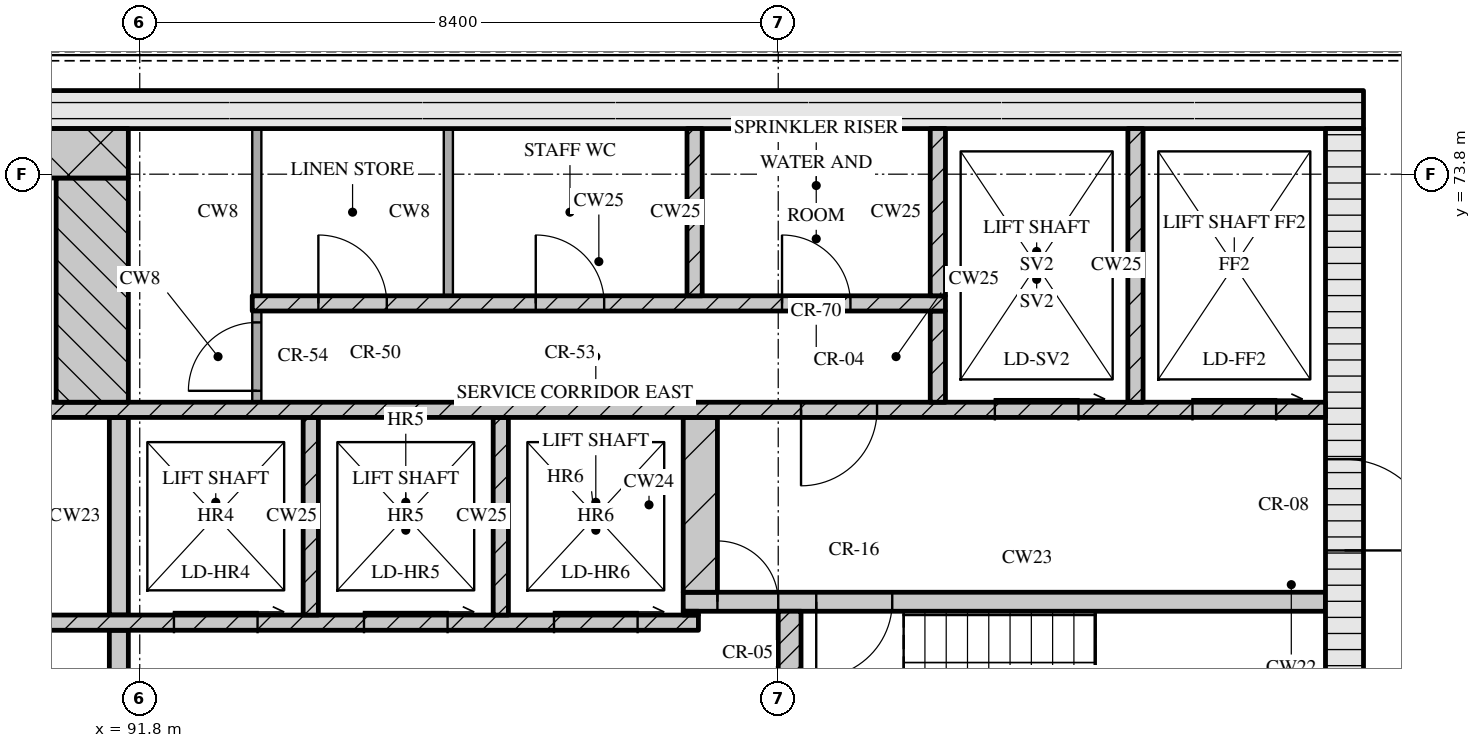
"""IFC4 building model, lengths in metres.
Left out: names, types, materials, properties, quantities, classifications, styles, units other than length and angle.
Written with IfcOpenShell. Run it as: python <this file> out.ifc"""

import sys

from ifc_helpers import new_model, si_unit, direction, frame, frame_2d, origin, place, context, subcontext, project, spatial, rectangle, extrude, element, fill, save


model = new_model("IFC4")
c1 = context("Model", 3, precision=1e-05, world=origin(), true_north=direction((0.0, 1.0)))
c2 = subcontext(c1, "Body", "Model", "MODEL_VIEW")
j1 = project(units=[si_unit("LENGTHUNIT", "METRE"), si_unit("PLANEANGLEUNIT", "RADIAN")], contexts=[c1])
p1 = place(None, origin())
s1 = spatial("IfcSite", under=j1, at=p1, CompositionType="ELEMENT")
p2 = place(p1, origin())
s2 = spatial("IfcBuilding", under=s1, at=p2, CompositionType="ELEMENT")
p3 = place(p2, frame((0.0, 0.0, 303.15)))
s3 = spatial("IfcBuildingStorey", under=s2, at=p3, CompositionType="ELEMENT", Elevation=303.15)
p4 = place(p3, frame((67.3, 74.65, 0.0), z_axis=(0.0, 0.0, 1.0), x_axis=(1.0, 0.0, 0.0)))
e1 = element("IfcWall", 1, at=p4, inside=s3, PredefinedType="SOLIDWALL", context=c2, shape_type="SweptSolid", body=[
    extrude(rectangle(XDim=40.6, YDim=0.5, at=frame_2d((20.3, 0.0))), origin(), (0.0, 0.0, 1.0), 3.32),
])
p5 = place(p3, frame((107.65, 62.4, 0.0), z_axis=(0.0, 0.0, 1.0), x_axis=(0.0, 1.0, 0.0)))
e2 = element("IfcWall", 2, at=p5, inside=s3, PredefinedType="SOLIDWALL", context=c2, shape_type="SweptSolid", body=[
    extrude(rectangle(XDim=12.0, YDim=0.5, at=frame_2d((6.0, 0.0))), origin(), (0.0, 0.0, 1.0), 3.32),
])
p6 = place(p5, frame((6.45, 0.0, 0.0)))
e3 = element("IfcOpeningElement", 3, at=p6, cuts=e2, PredefinedType="OPENING", context=c2, shape_type="SweptSolid", body=[
    extrude(rectangle(XDim=1.2, YDim=2.1, at=frame_2d((0.6, 1.05))), frame((0.0, 0.26, 0.0), z_axis=(0.0, -1.0, 0.0), x_axis=(1.0, 0.0, 0.0)), (0.0, 0.0, 1.0), 0.52),
])
p7 = place(p3, frame((91.525, 65.2, 0.0), z_axis=(0.0, 0.0, 1.0), x_axis=(0.0, 1.0, 0.0)))
e4 = element("IfcWall", 4, at=p7, inside=s3, PredefinedType="SOLIDWALL", context=c2, shape_type="SweptSolid", body=[
    extrude(rectangle(XDim=2.6, YDim=0.25, at=frame_2d((1.3, 0.0))), origin(), (0.0, 0.0, 1.0), 3.32),
])
p8 = place(p7, frame((0.7, 0.0, 0.0)))
e5 = element("IfcOpeningElement", 5, at=p8, cuts=e4, PredefinedType="OPENING", context=c2, shape_type="SweptSolid", body=[
    extrude(rectangle(XDim=1.2, YDim=2.1, at=frame_2d((0.6, 1.05))), frame((0.0, 0.135, 0.0), z_axis=(0.0, -1.0, 0.0), x_axis=(1.0, 0.0, 0.0)), (0.0, 0.0, 1.0), 0.27),
])
p9 = place(p3, frame((100.35, 65.2, 0.0), z_axis=(0.0, 0.0, 1.0), x_axis=(0.0, 1.0, 0.0)))
e6 = element("IfcWall", 6, at=p9, inside=s3, PredefinedType="SOLIDWALL", context=c2, shape_type="SweptSolid", body=[
    extrude(rectangle(XDim=2.85, YDim=0.3, at=frame_2d((1.425, 0.0))), origin(), (0.0, 0.0, 1.0), 3.32),
])
p10 = place(p3, frame((76.05, 67.9, 0.0), z_axis=(0.0, 0.0, 1.0), x_axis=(1.0, 0.0, 0.0)))
e7 = element("IfcWall", 7, at=p10, inside=s3, PredefinedType="SOLIDWALL", context=c2, shape_type="SweptSolid", body=[
    extrude(rectangle(XDim=23.1, YDim=0.2, at=frame_2d((11.55, 0.0))), origin(), (0.0, 0.0, 1.0), 3.32),
])
p11 = place(p10, frame((1.4, 0.0, 0.0)))
e8 = element("IfcOpeningElement", 8, at=p11, cuts=e7, PredefinedType="OPENING", context=c2, shape_type="SweptSolid", body=[
    extrude(rectangle(XDim=0.9, YDim=2.1, at=frame_2d((0.45, 1.05))), frame((0.0, 0.11, 0.0), z_axis=(0.0, -1.0, 0.0), x_axis=(1.0, 0.0, 0.0)), (0.0, 0.0, 1.0), 0.22),
])
p12 = place(p10, frame((5.11, 0.0, 0.0)))
e9 = element("IfcOpeningElement", 9, at=p12, cuts=e7, PredefinedType="OPENING", context=c2, shape_type="SweptSolid", body=[
    extrude(rectangle(XDim=0.9, YDim=2.1, at=frame_2d((0.45, 1.05))), frame((0.0, 0.11, 0.0), z_axis=(0.0, -1.0, 0.0), x_axis=(1.0, 0.0, 0.0)), (0.0, 0.0, 1.0), 0.22),
])
p13 = place(p10, frame((8.45, 0.0, 0.0)))
e10 = element("IfcOpeningElement", 10, at=p13, cuts=e7, PredefinedType="OPENING", context=c2, shape_type="SweptSolid", body=[
    extrude(rectangle(XDim=0.9, YDim=2.1, at=frame_2d((0.45, 1.05))), frame((0.0, 0.11, 0.0), z_axis=(0.0, -1.0, 0.0), x_axis=(1.0, 0.0, 0.0)), (0.0, 0.0, 1.0), 0.22),
])
p14 = place(p10, frame((10.91, 0.0, 0.0)))
e11 = element("IfcOpeningElement", 11, at=p14, cuts=e7, PredefinedType="OPENING", context=c2, shape_type="SweptSolid", body=[
    extrude(rectangle(XDim=0.9, YDim=2.1, at=frame_2d((0.45, 1.05))), frame((0.0, 0.11, 0.0), z_axis=(0.0, -1.0, 0.0), x_axis=(1.0, 0.0, 0.0)), (0.0, 0.0, 1.0), 0.22),
])
p15 = place(p10, frame((13.55, 0.0, 0.0)))
e12 = element("IfcOpeningElement", 12, at=p15, cuts=e7, PredefinedType="OPENING", context=c2, shape_type="SweptSolid", body=[
    extrude(rectangle(XDim=1.0, YDim=2.1, at=frame_2d((0.5, 1.05))), frame((0.0, 0.11, 0.0), z_axis=(0.0, -1.0, 0.0), x_axis=(1.0, 0.0, 0.0)), (0.0, 0.0, 1.0), 0.22),
])
p16 = place(p10, frame((16.2, 0.0, 0.0)))
e13 = element("IfcOpeningElement", 13, at=p16, cuts=e7, PredefinedType="OPENING", context=c2, shape_type="SweptSolid", body=[
    extrude(rectangle(XDim=1.1, YDim=2.1, at=frame_2d((0.55, 1.05))), frame((0.0, 0.11, 0.0), z_axis=(0.0, -1.0, 0.0), x_axis=(1.0, 0.0, 0.0)), (0.0, 0.0, 1.0), 0.22),
])
p17 = place(p10, frame((18.7, 0.0, 0.0)))
e14 = element("IfcOpeningElement", 14, at=p17, cuts=e7, PredefinedType="OPENING", context=c2, shape_type="SweptSolid", body=[
    extrude(rectangle(XDim=1.1, YDim=2.1, at=frame_2d((0.55, 1.05))), frame((0.0, 0.11, 0.0), z_axis=(0.0, -1.0, 0.0), x_axis=(1.0, 0.0, 0.0)), (0.0, 0.0, 1.0), 0.22),
])
p18 = place(p10, frame((21.2, 0.0, 0.0)))
e15 = element("IfcOpeningElement", 15, at=p18, cuts=e7, PredefinedType="OPENING", context=c2, shape_type="SweptSolid", body=[
    extrude(rectangle(XDim=1.1, YDim=2.1, at=frame_2d((0.55, 1.05))), frame((0.0, 0.11, 0.0), z_axis=(0.0, -1.0, 0.0), x_axis=(1.0, 0.0, 0.0)), (0.0, 0.0, 1.0), 0.22),
])
p19 = place(p3, frame((91.525, 68.0, 0.0), z_axis=(0.0, 0.0, 1.0), x_axis=(0.0, 1.0, 0.0)))
e16 = element("IfcWall", 16, at=p19, inside=s3, PredefinedType="SOLIDWALL", context=c2, shape_type="SweptSolid", body=[
    extrude(rectangle(XDim=2.6, YDim=0.25, at=frame_2d((1.3, 0.0))), origin(), (0.0, 0.0, 1.0), 3.32),
])
for number, where, z_axis, x_axis in (
    (17, (94.05, 68.0, 0.0), (0.0, 0.0, 1.0), (0.0, 1.0, 0.0)),
    (18, (96.55, 68.0, 0.0), (0.0, 0.0, 1.0), (0.0, 1.0, 0.0)),
):
    element("IfcWall", number, at=place(p3, frame(where, z_axis=z_axis, x_axis=x_axis)), inside=s3, PredefinedType="SOLIDWALL", context=c2, shape_type="SweptSolid", body=[
        extrude(rectangle(XDim=2.6, YDim=0.2, at=frame_2d((1.3, 0.0))), origin(), (0.0, 0.0, 1.0), 3.32),
    ])
p20 = place(p3, frame((98.95, 68.025, 0.0), z_axis=(0.0, 0.0, 1.0), x_axis=(1.0, 0.0, 0.0)))
e19 = element("IfcWall", 19, at=p20, inside=s3, PredefinedType="SOLIDWALL", context=c2, shape_type="SweptSolid", body=[
    extrude(rectangle(XDim=0.2, YDim=0.05, at=frame_2d((0.1, 0.0))), origin(), (0.0, 0.0, 1.0), 3.32),
])
p21 = place(p3, frame((98.95, 68.175, 0.0), z_axis=(0.0, 0.0, 1.0), x_axis=(1.0, 0.0, 0.0)))
e20 = element("IfcWall", 20, at=p21, inside=s3, PredefinedType="SOLIDWALL", context=c2, shape_type="SweptSolid", body=[
    extrude(rectangle(XDim=8.45, YDim=0.25, at=frame_2d((4.225, 0.0))), origin(), (0.0, 0.0, 1.0), 3.32),
])
p22 = place(p21, frame((0.45, 0.0, 0.0)))
e21 = element("IfcOpeningElement", 21, at=p22, cuts=e20, PredefinedType="OPENING", context=c2, shape_type="SweptSolid", body=[
    extrude(rectangle(XDim=0.8, YDim=2.1, at=frame_2d((0.4, 1.05))), frame((0.0, 0.135, 0.0), z_axis=(0.0, -1.0, 0.0), x_axis=(1.0, 0.0, 0.0)), (0.0, 0.0, 1.0), 0.27),
])
p23 = place(p21, frame((1.75, 0.0, 0.0)))
e22 = element("IfcOpeningElement", 22, at=p23, cuts=e20, PredefinedType="OPENING", context=c2, shape_type="SweptSolid", body=[
    extrude(rectangle(XDim=1.0, YDim=2.1, at=frame_2d((0.5, 1.05))), frame((0.0, 0.135, 0.0), z_axis=(0.0, -1.0, 0.0), x_axis=(1.0, 0.0, 0.0)), (0.0, 0.0, 1.0), 0.27),
])
p24 = place(p3, frame((99.175, 68.3, 0.0), z_axis=(0.0, 0.0, 1.0), x_axis=(0.0, 1.0, 0.0)))
e23 = element("IfcWall", 23, at=p24, inside=s3, PredefinedType="SOLIDWALL", context=c2, shape_type="SweptSolid", body=[
    extrude(rectangle(XDim=2.3, YDim=0.45, at=frame_2d((1.15, 0.0))), origin(), (0.0, 0.0, 1.0), 3.32),
])
p25 = place(p3, frame((67.8, 70.7, 0.0), z_axis=(0.0, 0.0, 1.0), x_axis=(1.0, 0.0, 0.0)))
e24 = element("IfcWall", 24, at=p25, inside=s3, PredefinedType="SOLIDWALL", context=c2, shape_type="SweptSolid", body=[
    extrude(rectangle(XDim=39.6, YDim=0.2, at=frame_2d((19.8, 0.0))), origin(), (0.0, 0.0, 1.0), 3.32),
])
p26 = place(p25, frame((0.65, 0.0, 0.0)))
e25 = element("IfcOpeningElement", 25, at=p26, cuts=e24, PredefinedType="OPENING", context=c2, shape_type="SweptSolid", body=[
    extrude(rectangle(XDim=1.1, YDim=2.1, at=frame_2d((0.55, 1.05))), frame((0.0, 0.11, 0.0), z_axis=(0.0, -1.0, 0.0), x_axis=(1.0, 0.0, 0.0)), (0.0, 0.0, 1.0), 0.22),
])
p27 = place(p25, frame((3.25, 0.0, 0.0)))
e26 = element("IfcOpeningElement", 26, at=p27, cuts=e24, PredefinedType="OPENING", context=c2, shape_type="SweptSolid", body=[
    extrude(rectangle(XDim=1.1, YDim=2.1, at=frame_2d((0.55, 1.05))), frame((0.0, 0.11, 0.0), z_axis=(0.0, -1.0, 0.0), x_axis=(1.0, 0.0, 0.0)), (0.0, 0.0, 1.0), 0.22),
])
p28 = place(p25, frame((5.9, 0.0, 0.0)))
e27 = element("IfcOpeningElement", 27, at=p28, cuts=e24, PredefinedType="OPENING", context=c2, shape_type="SweptSolid", body=[
    extrude(rectangle(XDim=1.0, YDim=2.1, at=frame_2d((0.5, 1.05))), frame((0.0, 0.11, 0.0), z_axis=(0.0, -1.0, 0.0), x_axis=(1.0, 0.0, 0.0)), (0.0, 0.0, 1.0), 0.22),
])
p29 = place(p25, frame((21.7, 0.0, 0.0)))
e28 = element("IfcOpeningElement", 28, at=p29, cuts=e24, PredefinedType="OPENING", context=c2, shape_type="SweptSolid", body=[
    extrude(rectangle(XDim=1.0, YDim=2.1, at=frame_2d((0.5, 1.05))), frame((0.0, 0.11, 0.0), z_axis=(0.0, -1.0, 0.0), x_axis=(1.0, 0.0, 0.0)), (0.0, 0.0, 1.0), 0.22),
])
p30 = place(p25, frame((32.7, 0.0, 0.0)))
e29 = element("IfcOpeningElement", 29, at=p30, cuts=e24, PredefinedType="OPENING", context=c2, shape_type="SweptSolid", body=[
    extrude(rectangle(XDim=1.0, YDim=2.1, at=frame_2d((0.5, 1.05))), frame((0.0, 0.11, 0.0), z_axis=(0.0, -1.0, 0.0), x_axis=(1.0, 0.0, 0.0)), (0.0, 0.0, 1.0), 0.22),
])
p31 = place(p25, frame((35.25, 0.0, 0.0)))
e30 = element("IfcOpeningElement", 30, at=p31, cuts=e24, PredefinedType="OPENING", context=c2, shape_type="SweptSolid", body=[
    extrude(rectangle(XDim=1.1, YDim=2.1, at=frame_2d((0.55, 1.05))), frame((0.0, 0.11, 0.0), z_axis=(0.0, -1.0, 0.0), x_axis=(1.0, 0.0, 0.0)), (0.0, 0.0, 1.0), 0.22),
])
p32 = place(p25, frame((37.85, 0.0, 0.0)))
e31 = element("IfcOpeningElement", 31, at=p32, cuts=e24, PredefinedType="OPENING", context=c2, shape_type="SweptSolid", body=[
    extrude(rectangle(XDim=1.1, YDim=2.1, at=frame_2d((0.55, 1.05))), frame((0.0, 0.11, 0.0), z_axis=(0.0, -1.0, 0.0), x_axis=(1.0, 0.0, 0.0)), (0.0, 0.0, 1.0), 0.22),
])
p33 = place(p3, frame((91.175, 70.8, 0.0), z_axis=(0.0, 0.0, 1.0), x_axis=(0.0, 1.0, 0.0)))
e32 = element("IfcWall", 32, at=p33, inside=s3, PredefinedType="SOLIDWALL", context=c2, shape_type="SweptSolid", body=[
    extrude(rectangle(XDim=2.95, YDim=0.95, at=frame_2d((1.475, 0.0))), origin(), (0.0, 0.0, 1.0), 3.32),
])
p34 = place(p3, frame((93.34, 70.8, 0.0), z_axis=(0.0, 0.0, 1.0), x_axis=(0.0, 1.0, 0.0)))
e33 = element("IfcWall", 33, at=p34, inside=s3, PredefinedType="PARTITIONING", context=c2, shape_type="SweptSolid", body=[
    extrude(rectangle(XDim=1.2, YDim=0.12, at=frame_2d((0.6, 0.0))), origin(), (0.0, 0.0, 1.0), 3.32),
])
p35 = place(p34, frame((0.15, 0.0, 0.0)))
e34 = element("IfcOpeningElement", 34, at=p35, cuts=e33, PredefinedType="OPENING", context=c2, shape_type="SweptSolid", body=[
    extrude(rectangle(XDim=0.9, YDim=2.1, at=frame_2d((0.45, 1.05))), frame((0.0, 0.07, 0.0), z_axis=(0.0, -1.0, 0.0), x_axis=(1.0, 0.0, 0.0)), (0.0, 0.0, 1.0), 0.14),
])
p36 = place(p3, frame((102.3, 70.8, 0.0), z_axis=(0.0, 0.0, 1.0), x_axis=(0.0, 1.0, 0.0)))
e35 = element("IfcWall", 35, at=p36, inside=s3, PredefinedType="SOLIDWALL", context=c2, shape_type="SweptSolid", body=[
    extrude(rectangle(XDim=1.2, YDim=0.2, at=frame_2d((0.6, 0.0))), origin(), (0.0, 0.0, 1.0), 3.32),
])
p37 = place(p3, frame((104.9, 70.8, 0.0), z_axis=(0.0, 0.0, 1.0), x_axis=(0.0, 1.0, 0.0)))
e36 = element("IfcWall", 36, at=p37, inside=s3, PredefinedType="SOLIDWALL", context=c2, shape_type="SweptSolid", body=[
    extrude(rectangle(XDim=3.6, YDim=0.2, at=frame_2d((1.8, 0.0))), origin(), (0.0, 0.0, 1.0), 3.32),
])
p38 = place(p3, frame((93.28, 72.1, 0.0), z_axis=(0.0, 0.0, 1.0), x_axis=(1.0, 0.0, 0.0)))
e37 = element("IfcWall", 37, at=p38, inside=s3, PredefinedType="SOLIDWALL", context=c2, shape_type="SweptSolid", body=[
    extrude(rectangle(XDim=9.12, YDim=0.2, at=frame_2d((4.56, 0.0))), origin(), (0.0, 0.0, 1.0), 3.32),
])
p39 = place(p38, frame((0.87, 0.0, 0.0)))
e38 = element("IfcOpeningElement", 38, at=p39, cuts=e37, PredefinedType="OPENING", context=c2, shape_type="SweptSolid", body=[
    extrude(rectangle(XDim=0.9, YDim=2.1, at=frame_2d((0.45, 1.05))), frame((0.0, 0.11, 0.0), z_axis=(0.0, -1.0, 0.0), x_axis=(1.0, 0.0, 0.0)), (0.0, 0.0, 1.0), 0.22),
])
p40 = place(p38, frame((3.73, 0.0, 0.0)))
e39 = element("IfcOpeningElement", 39, at=p40, cuts=e37, PredefinedType="OPENING", context=c2, shape_type="SweptSolid", body=[
    extrude(rectangle(XDim=0.9, YDim=2.1, at=frame_2d((0.45, 1.05))), frame((0.0, 0.11, 0.0), z_axis=(0.0, -1.0, 0.0), x_axis=(1.0, 0.0, 0.0)), (0.0, 0.0, 1.0), 0.22),
])
p41 = place(p38, frame((6.97, 0.0, 0.0)))
e40 = element("IfcOpeningElement", 40, at=p41, cuts=e37, PredefinedType="OPENING", context=c2, shape_type="SweptSolid", body=[
    extrude(rectangle(XDim=0.9, YDim=2.1, at=frame_2d((0.45, 1.05))), frame((0.0, 0.11, 0.0), z_axis=(0.0, -1.0, 0.0), x_axis=(1.0, 0.0, 0.0)), (0.0, 0.0, 1.0), 0.22),
])
for number, where, z_axis, x_axis in (
    (41, (93.34, 72.2, 0.0), (0.0, 0.0, 1.0), (0.0, 1.0, 0.0)),
    (42, (95.86, 72.2, 0.0), (0.0, 0.0, 1.0), (0.0, 1.0, 0.0)),
):
    element("IfcWall", number, at=place(p3, frame(where, z_axis=z_axis, x_axis=x_axis)), inside=s3, PredefinedType="PARTITIONING", context=c2, shape_type="SweptSolid", body=[
        extrude(rectangle(XDim=2.2, YDim=0.12, at=frame_2d((1.1, 0.0))), origin(), (0.0, 0.0, 1.0), 3.32),
    ])
for number, where, z_axis, x_axis in (
    (43, (99.1, 72.2, 0.0), (0.0, 0.0, 1.0), (0.0, 1.0, 0.0)),
    (44, (102.3, 72.2, 0.0), (0.0, 0.0, 1.0), (0.0, 1.0, 0.0)),
):
    element("IfcWall", number, at=place(p3, frame(where, z_axis=z_axis, x_axis=x_axis)), inside=s3, PredefinedType="SOLIDWALL", context=c2, shape_type="SweptSolid", body=[
        extrude(rectangle(XDim=2.2, YDim=0.2, at=frame_2d((1.1, 0.0))), origin(), (0.0, 0.0, 1.0), 3.32),
    ])
p42 = place(p3, frame((83.55, 74.075, 0.0), z_axis=(0.0, 0.0, 1.0), x_axis=(1.0, 0.0, 0.0)))
e45 = element("IfcWall", 45, at=p42, inside=s3, PredefinedType="SOLIDWALL", context=c2, shape_type="SweptSolid", body=[
    extrude(rectangle(XDim=8.1, YDim=0.65, at=frame_2d((4.05, 0.0))), origin(), (0.0, 0.0, 1.0), 3.32),
])
p43 = place(p16, origin())
e46 = element("IfcDoor", 46, at=p43, inside=s3, OperationType="SLIDING_TO_RIGHT", PredefinedType="DOOR", context=c2, shape_type="SweptSolid", body=[
    extrude(rectangle(XDim=1.1, YDim=2.1, at=frame_2d((0.55, 1.05))), frame((0.0, 0.025, 0.0), z_axis=(0.0, -1.0, 0.0), x_axis=(1.0, 0.0, 0.0)), (0.0, 0.0, 1.0), 0.05),
])
fill(e13, e46)
p44 = place(p17, origin())
e47 = element("IfcDoor", 47, at=p44, inside=s3, OperationType="SLIDING_TO_RIGHT", PredefinedType="DOOR", context=c2, shape_type="SweptSolid", body=[
    extrude(rectangle(XDim=1.1, YDim=2.1, at=frame_2d((0.55, 1.05))), frame((0.0, 0.025, 0.0), z_axis=(0.0, -1.0, 0.0), x_axis=(1.0, 0.0, 0.0)), (0.0, 0.0, 1.0), 0.05),
])
fill(e14, e47)
p45 = place(p18, origin())
e48 = element("IfcDoor", 48, at=p45, inside=s3, OperationType="SLIDING_TO_RIGHT", PredefinedType="DOOR", context=c2, shape_type="SweptSolid", body=[
    extrude(rectangle(XDim=1.1, YDim=2.1, at=frame_2d((0.55, 1.05))), frame((0.0, 0.025, 0.0), z_axis=(0.0, -1.0, 0.0), x_axis=(1.0, 0.0, 0.0)), (0.0, 0.0, 1.0), 0.05),
])
fill(e15, e48)
p46 = place(p22, origin())
e49 = element("IfcDoor", 49, at=p46, inside=s3, OperationType="SINGLE_SWING_LEFT", PredefinedType="DOOR", context=c2, shape_type="SweptSolid", body=[
    extrude(rectangle(XDim=0.8, YDim=2.1, at=frame_2d((0.4, 1.05))), frame((0.0, 0.025, 0.0), z_axis=(0.0, -1.0, 0.0), x_axis=(1.0, 0.0, 0.0)), (0.0, 0.0, 1.0), 0.05),
])
fill(e21, e49)
p47 = place(p23, origin())
e50 = element("IfcDoor", 50, at=p47, inside=s3, OperationType="SINGLE_SWING_RIGHT", PredefinedType="DOOR", context=c2, shape_type="SweptSolid", body=[
    extrude(rectangle(XDim=1.0, YDim=2.1, at=frame_2d((0.5, 1.05))), frame((0.0, 0.025, 0.0), z_axis=(0.0, -1.0, 0.0), x_axis=(1.0, 0.0, 0.0)), (0.0, 0.0, 1.0), 0.05),
])
fill(e22, e50)
p48 = place(p6, origin())
e51 = element("IfcDoor", 51, at=p48, inside=s3, OperationType="SINGLE_SWING_RIGHT", PredefinedType="DOOR", context=c2, shape_type="SweptSolid", body=[
    extrude(rectangle(XDim=1.2, YDim=2.1, at=frame_2d((0.6, 1.05))), frame((0.0, 0.025, 0.0), z_axis=(0.0, -1.0, 0.0), x_axis=(1.0, 0.0, 0.0)), (0.0, 0.0, 1.0), 0.05),
])
fill(e3, e51)
p49 = place(p30, origin())
e52 = element("IfcDoor", 52, at=p49, inside=s3, OperationType="SINGLE_SWING_RIGHT", PredefinedType="DOOR", context=c2, shape_type="SweptSolid", body=[
    extrude(rectangle(XDim=1.0, YDim=2.1, at=frame_2d((0.5, 1.05))), frame((0.0, 0.025, 0.0), z_axis=(0.0, -1.0, 0.0), x_axis=(1.0, 0.0, 0.0)), (0.0, 0.0, 1.0), 0.05),
])
fill(e29, e52)
p50 = place(p31, origin())
e53 = element("IfcDoor", 53, at=p50, inside=s3, OperationType="SLIDING_TO_RIGHT", PredefinedType="DOOR", context=c2, shape_type="SweptSolid", body=[
    extrude(rectangle(XDim=1.1, YDim=2.1, at=frame_2d((0.55, 1.05))), frame((0.0, 0.025, 0.0), z_axis=(0.0, -1.0, 0.0), x_axis=(1.0, 0.0, 0.0)), (0.0, 0.0, 1.0), 0.05),
])
fill(e30, e53)
p51 = place(p32, origin())
e54 = element("IfcDoor", 54, at=p51, inside=s3, OperationType="SLIDING_TO_RIGHT", PredefinedType="DOOR", context=c2, shape_type="SweptSolid", body=[
    extrude(rectangle(XDim=1.1, YDim=2.1, at=frame_2d((0.55, 1.05))), frame((0.0, 0.025, 0.0), z_axis=(0.0, -1.0, 0.0), x_axis=(1.0, 0.0, 0.0)), (0.0, 0.0, 1.0), 0.05),
])
fill(e31, e54)
p52 = place(p35, origin())
e55 = element("IfcDoor", 55, at=p52, inside=s3, OperationType="SINGLE_SWING_LEFT", PredefinedType="DOOR", context=c2, shape_type="SweptSolid", body=[
    extrude(rectangle(XDim=0.9, YDim=2.1, at=frame_2d((0.45, 1.05))), frame((0.0, 0.025, 0.0), z_axis=(0.0, -1.0, 0.0), x_axis=(1.0, 0.0, 0.0)), (0.0, 0.0, 1.0), 0.05),
])
fill(e34, e55)
p53 = place(p39, origin())
e56 = element("IfcDoor", 56, at=p53, inside=s3, OperationType="SINGLE_SWING_LEFT", PredefinedType="DOOR", context=c2, shape_type="SweptSolid", body=[
    extrude(rectangle(XDim=0.9, YDim=2.1, at=frame_2d((0.45, 1.05))), frame((0.0, 0.025, 0.0), z_axis=(0.0, -1.0, 0.0), x_axis=(1.0, 0.0, 0.0)), (0.0, 0.0, 1.0), 0.05),
])
fill(e38, e56)
p54 = place(p40, origin())
e57 = element("IfcDoor", 57, at=p54, inside=s3, OperationType="SINGLE_SWING_LEFT", PredefinedType="DOOR", context=c2, shape_type="SweptSolid", body=[
    extrude(rectangle(XDim=0.9, YDim=2.1, at=frame_2d((0.45, 1.05))), frame((0.0, 0.025, 0.0), z_axis=(0.0, -1.0, 0.0), x_axis=(1.0, 0.0, 0.0)), (0.0, 0.0, 1.0), 0.05),
])
fill(e39, e57)
p55 = place(p41, origin())
e58 = element("IfcDoor", 58, at=p55, inside=s3, OperationType="SINGLE_SWING_LEFT", PredefinedType="DOOR", context=c2, shape_type="SweptSolid", body=[
    extrude(rectangle(XDim=0.9, YDim=2.1, at=frame_2d((0.45, 1.05))), frame((0.0, 0.025, 0.0), z_axis=(0.0, -1.0, 0.0), x_axis=(1.0, 0.0, 0.0)), (0.0, 0.0, 1.0), 0.05),
])
fill(e40, e58)
save(model, sys.argv[1])
